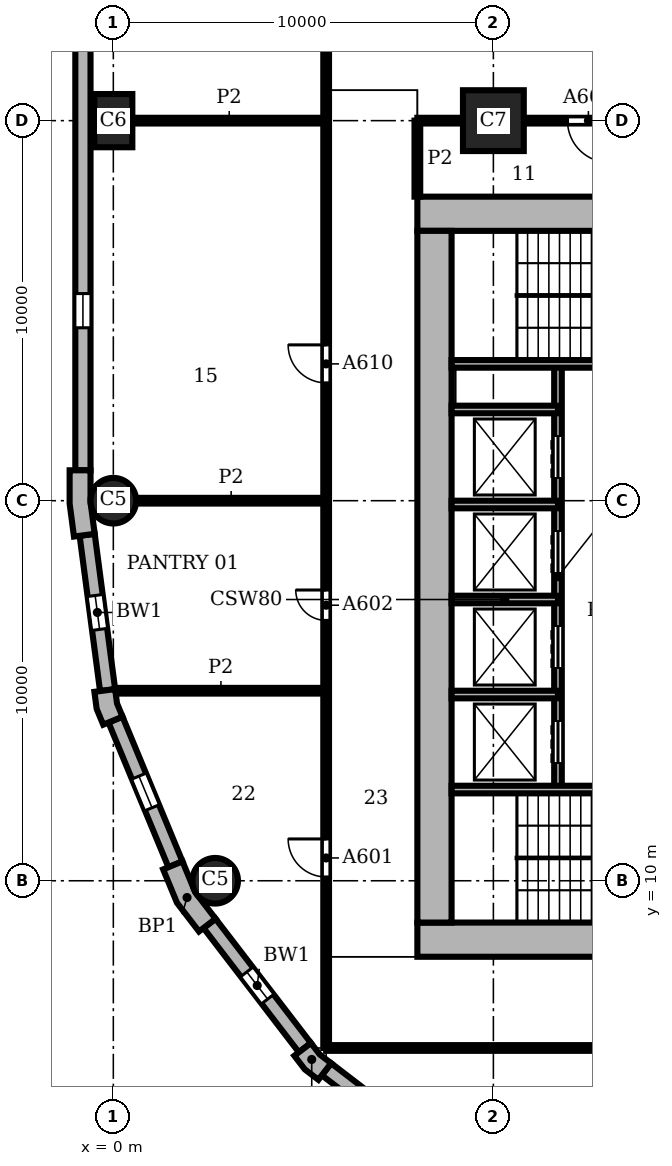
"""IFC4 building model, lengths in metres.
Left out: names, types, materials, properties, quantities, classifications, styles, units other than length and angle.
Written with IfcOpenShell. Run it as: python <this file> out.ifc"""

import sys

from ifc_helpers import new_model, si_unit, direction, frame, frame_2d, origin, origin_2d, place, context, subcontext, project, spatial, polyline, rectangle, circle, outline, extrude, element, fill, save


model = new_model("IFC4")
c1 = context("Model", 3, precision=1e-05, world=origin(), true_north=direction((0.0, 1.0)))
c2 = subcontext(c1, "Body", "Model", "MODEL_VIEW")
j1 = project(units=[si_unit("LENGTHUNIT", "METRE"), si_unit("PLANEANGLEUNIT", "RADIAN")], contexts=[c1])
p1 = place(None, origin())
s1 = spatial("IfcSite", under=j1, at=p1, CompositionType="ELEMENT")
p2 = place(p1, origin())
s2 = spatial("IfcBuilding", under=s1, at=p2, CompositionType="ELEMENT")
p3 = place(p2, frame((0.0, 0.0, 70.5)))
s3 = spatial("IfcBuildingStorey", under=s2, at=p3, CompositionType="ELEMENT", Elevation=70.5)
p4 = place(p3, frame((0.0, 30.0, 0.0), z_axis=(0.0, 0.0, 1.0), x_axis=(0.0, 1.0, 0.0)))
e1 = element("IfcColumn", 1, at=p4, inside=s3, PredefinedType="COLUMN", context=c2, shape_type="SweptSolid", body=[
    extrude(rectangle(XDim=1.4, YDim=1.0, at=origin_2d()), origin(), (0.0, 0.0, 1.0), 3.9),
])
for number, where, z_axis, x_axis in (
    (2, (0.0, 20.0, 0.0), (0.0, 0.0, 1.0), (1.0, 0.0, 0.0)),
    (3, (2.679, 10.0, 0.0), (0.0, 0.0, 1.0), (1.0, 0.0, 0.0)),
):
    element("IfcColumn", number, at=place(p3, frame(where, z_axis=z_axis, x_axis=x_axis)), inside=s3, PredefinedType="COLUMN", context=c2, shape_type="SweptSolid", body=[
        extrude(circle(Radius=0.6, at=origin_2d()), origin(), (0.0, 0.0, 1.0), 3.9),
    ])
p5 = place(p3, frame((10.0, 30.0, 0.0), z_axis=(0.0, 0.0, 1.0), x_axis=(1.0, 0.0, 0.0)))
e4 = element("IfcColumn", 4, at=p5, inside=s3, PredefinedType="COLUMN", context=c2, shape_type="SweptSolid", body=[
    extrude(rectangle(XDim=1.6, YDim=1.6, at=origin_2d()), origin(), (0.0, 0.0, 1.0), 3.9),
])
for number, where, z_axis, x_axis in (
    (5, (8.0, 8.45, 0.0), (0.0, 0.0, 1.0), (1.0, 0.0, 0.0)),
    (6, (28.0, 27.55, 0.0), (0.0, 0.0, 1.0), (-1.0, 0.0, 0.0)),
):
    element("IfcWall", number, at=place(p3, frame(where, z_axis=z_axis, x_axis=x_axis)), inside=s3, PredefinedType="SHEAR", context=c2, shape_type="SweptSolid", body=[
        extrude(rectangle(XDim=20.0, YDim=0.9, at=frame_2d((10.0, 0.0))), origin(), (0.0, 0.0, 1.0), 3.9),
    ])
p6 = place(p3, frame((8.45, 27.1, 0.0), z_axis=(0.0, 0.0, 1.0), x_axis=(0.0, -1.0, 0.0)))
e7 = element("IfcWall", 7, at=p6, inside=s3, PredefinedType="SHEAR", context=c2, shape_type="SweptSolid", body=[
    extrude(rectangle(XDim=18.2, YDim=0.9, at=frame_2d((9.1, 0.0))), origin(), (0.0, 0.0, 1.0), 3.9),
])
p7 = place(p3, origin())
e8 = element("IfcWall", 8, at=p7, inside=s3, PredefinedType="SOLIDWALL", context=c2, shape_type="SweptSolid", body=[
    extrude(outline(polyline([(-1.0, 20.8), (-1.15, 20.8), (-1.15, 19.925), (-1.036, 19.057), (-0.887, 19.076), (-0.49, 19.128), (-0.6, 19.961), (-0.6, 20.8), (-1.0, 20.8)])), origin(), (0.0, 0.0, 1.0), 3.9),
])
e9 = element("IfcWall", 9, at=p7, inside=s3, PredefinedType="SOLIDWALL", context=c2, shape_type="SweptSolid", body=[
    extrude(outline(polyline([(-0.349, 14.99), (-0.498, 14.971), (-0.439, 14.523), (-0.266, 14.106), (-0.128, 14.164), (0.242, 14.317), (0.097, 14.667), (0.047, 15.043), (-0.349, 14.99)])), origin(), (0.0, 0.0, 1.0), 3.9),
])
e10 = element("IfcWall", 10, at=p7, inside=s3, PredefinedType="SOLIDWALL", context=c2, shape_type="SweptSolid", body=[
    extrude(outline(polyline([(1.449, 10.356), (1.311, 10.299), (1.675, 9.42), (2.254, 8.665), (2.373, 8.757), (2.69, 9.0), (2.155, 9.698), (1.819, 10.51), (1.449, 10.356)])), origin(), (0.0, 0.0, 1.0), 3.9),
])
e11 = element("IfcWall", 11, at=p7, inside=s3, PredefinedType="SOLIDWALL", context=c2, shape_type="SweptSolid", body=[
    extrude(outline(polyline([(4.882, 5.487), (4.763, 5.396), (5.038, 5.038), (5.396, 4.763), (5.487, 4.882), (5.731, 5.199), (5.43, 5.43), (5.199, 5.731), (4.882, 5.487)])), origin(), (0.0, 0.0, 1.0), 3.9),
])
p8 = place(p3, frame((-0.8, 39.2, 0.0), z_axis=(0.0, 0.0, 1.0), x_axis=(0.0, -1.0, 0.0)))
e12 = element("IfcWall", 12, at=p8, inside=s3, PredefinedType="SOLIDWALL", context=c2, shape_type="SweptSolid", body=[
    extrude(rectangle(XDim=18.4, YDim=0.4, at=frame_2d((9.2, 0.0))), origin(), (0.0, 0.0, 1.0), 3.9),
])
p9 = place(p8, frame((3.75, 0.0, 0.9)))
e13 = element("IfcOpeningElement", 13, at=p9, cuts=e12, PredefinedType="OPENING", context=c2, shape_type="SweptSolid", body=[
    extrude(rectangle(XDim=0.9, YDim=2.35, at=frame_2d((0.45, 1.175))), frame((0.0, 0.21, 0.0), z_axis=(0.0, -1.0, 0.0), x_axis=(1.0, 0.0, 0.0)), (0.0, 0.0, 1.0), 0.42),
])
p10 = place(p8, frame((13.75, 0.0, 0.9)))
e14 = element("IfcOpeningElement", 14, at=p10, cuts=e12, PredefinedType="OPENING", context=c2, shape_type="SweptSolid", body=[
    extrude(rectangle(XDim=0.9, YDim=2.35, at=frame_2d((0.45, 1.175))), frame((0.0, 0.21, 0.0), z_axis=(0.0, -1.0, 0.0), x_axis=(1.0, 0.0, 0.0)), (0.0, 0.0, 1.0), 0.42),
])
p11 = place(p3, frame((-0.689, 19.102, 0.0), z_axis=(0.0, 0.0, 1.0), x_axis=(0.130514280502, -0.991446429508, 0.0)))
e15 = element("IfcWall", 15, at=p11, inside=s3, PredefinedType="SOLIDWALL", context=c2, shape_type="SweptSolid", body=[
    extrude(rectangle(XDim=4.121, YDim=0.4, at=frame_2d((2.061, 0.0))), origin(), (0.0, 0.0, 1.0), 3.9),
])
p12 = place(p11, frame((1.611, 0.0, 0.9)))
e16 = element("IfcOpeningElement", 16, at=p12, cuts=e15, PredefinedType="OPENING", context=c2, shape_type="SweptSolid", body=[
    extrude(rectangle(XDim=0.9, YDim=2.35, at=frame_2d((0.45, 1.175))), frame((0.0, 0.21, 0.0), z_axis=(0.0, -1.0, 0.0), x_axis=(1.0, 0.0, 0.0)), (0.0, 0.0, 1.0), 0.42),
])
p13 = place(p3, frame((0.057, 14.24, 0.0), z_axis=(0.0, 0.0, 1.0), x_axis=(0.382721546029, -0.923863744394, 0.0)))
e17 = element("IfcWall", 17, at=p13, inside=s3, PredefinedType="SOLIDWALL", context=c2, shape_type="SweptSolid", body=[
    extrude(rectangle(XDim=4.121, YDim=0.4, at=frame_2d((2.061, 0.0))), origin(), (0.0, 0.0, 1.0), 3.9),
])
p14 = place(p13, frame((1.611, 0.0, 0.9)))
e18 = element("IfcOpeningElement", 18, at=p14, cuts=e17, PredefinedType="OPENING", context=c2, shape_type="SweptSolid", body=[
    extrude(rectangle(XDim=0.9, YDim=2.35, at=frame_2d((0.45, 1.175))), frame((0.0, 0.21, 0.0), z_axis=(0.0, -1.0, 0.0), x_axis=(1.0, 0.0, 0.0)), (0.0, 0.0, 1.0), 0.42),
])
p15 = place(p3, frame((2.532, 8.878, 0.0), z_axis=(0.0, 0.0, 1.0), x_axis=(0.608759824817, -0.793354571229, 0.0)))
e19 = element("IfcWall", 19, at=p15, inside=s3, PredefinedType="SOLIDWALL", context=c2, shape_type="SweptSolid", body=[
    extrude(rectangle(XDim=4.121, YDim=0.4, at=frame_2d((2.061, 0.0))), origin(), (0.0, 0.0, 1.0), 3.9),
])
p16 = place(p15, frame((1.611, 0.0, 0.9)))
e20 = element("IfcOpeningElement", 20, at=p16, cuts=e19, PredefinedType="OPENING", context=c2, shape_type="SweptSolid", body=[
    extrude(rectangle(XDim=0.9, YDim=2.35, at=frame_2d((0.45, 1.175))), frame((0.0, 0.21, 0.0), z_axis=(0.0, -1.0, 0.0), x_axis=(1.0, 0.0, 0.0)), (0.0, 0.0, 1.0), 0.42),
])
p17 = place(p3, frame((5.609, 5.041, 0.0), z_axis=(0.0, 0.0, 1.0), x_axis=(0.793354571229, -0.608759824817, 0.0)))
e21 = element("IfcWall", 21, at=p17, inside=s3, PredefinedType="SOLIDWALL", context=c2, shape_type="SweptSolid", body=[
    extrude(rectangle(XDim=4.121, YDim=0.4, at=frame_2d((2.061, 0.0))), origin(), (0.0, 0.0, 1.0), 3.9),
])
p18 = place(p17, frame((1.611, 0.0, 0.9)))
e22 = element("IfcOpeningElement", 22, at=p18, cuts=e21, PredefinedType="OPENING", context=c2, shape_type="SweptSolid", body=[
    extrude(rectangle(XDim=0.9, YDim=2.35, at=frame_2d((0.45, 1.175))), frame((0.0, 0.21, 0.0), z_axis=(0.0, -1.0, 0.0), x_axis=(1.0, 0.0, 0.0)), (0.0, 0.0, 1.0), 0.42),
])
p19 = place(p3, frame((8.9, 12.4, 0.0), z_axis=(0.0, 0.0, 1.0), x_axis=(1.0, 0.0, 0.0)))
e23 = element("IfcWall", 23, at=p19, inside=s3, PredefinedType="SHEAR", context=c2, shape_type="SweptSolid", body=[
    extrude(rectangle(XDim=4.9, YDim=0.2, at=frame_2d((2.45, 0.0))), origin(), (0.0, 0.0, 1.0), 3.58),
])
for number, where, z_axis, x_axis in (
    (24, (8.9, 14.9, 0.0), (0.0, 0.0, 1.0), (1.0, 0.0, 0.0)),
    (25, (8.9, 17.4, 0.0), (0.0, 0.0, 1.0), (1.0, 0.0, 0.0)),
    (26, (8.9, 19.9, 0.0), (0.0, 0.0, 1.0), (1.0, 0.0, 0.0)),
    (27, (8.9, 22.4, 0.0), (0.0, 0.0, 1.0), (1.0, 0.0, 0.0)),
):
    element("IfcWall", number, at=place(p3, frame(where, z_axis=z_axis, x_axis=x_axis)), inside=s3, PredefinedType="SHEAR", context=c2, shape_type="SweptSolid", body=[
        extrude(rectangle(XDim=2.8, YDim=0.2, at=frame_2d((1.4, 0.0))), origin(), (0.0, 0.0, 1.0), 3.58),
    ])
p20 = place(p3, frame((8.9, 23.6, 0.0), z_axis=(0.0, 0.0, 1.0), x_axis=(1.0, 0.0, 0.0)))
e28 = element("IfcWall", 28, at=p20, inside=s3, PredefinedType="SHEAR", context=c2, shape_type="SweptSolid", body=[
    extrude(rectangle(XDim=4.9, YDim=0.2, at=frame_2d((2.45, 0.0))), origin(), (0.0, 0.0, 1.0), 3.58),
])
p21 = place(p3, frame((11.7, 12.4, 0.0), z_axis=(0.0, 0.0, 1.0), x_axis=(0.0, 1.0, 0.0)))
e29 = element("IfcWall", 29, at=p21, inside=s3, PredefinedType="SHEAR", context=c2, shape_type="SweptSolid", body=[
    extrude(rectangle(XDim=11.2, YDim=0.2, at=frame_2d((5.6, 0.0))), origin(), (0.0, 0.0, 1.0), 3.58),
])
p22 = place(p21, frame((0.7, 0.0, 0.0)))
e30 = element("IfcOpeningElement", 30, at=p22, cuts=e29, PredefinedType="OPENING", context=c2, shape_type="SweptSolid", body=[
    extrude(rectangle(XDim=1.1, YDim=2.1, at=frame_2d((0.55, 1.05))), frame((0.0, 0.11, 0.0), z_axis=(0.0, -1.0, 0.0), x_axis=(1.0, 0.0, 0.0)), (0.0, 0.0, 1.0), 0.22),
])
p23 = place(p21, frame((3.2, 0.0, 0.0)))
e31 = element("IfcOpeningElement", 31, at=p23, cuts=e29, PredefinedType="OPENING", context=c2, shape_type="SweptSolid", body=[
    extrude(rectangle(XDim=1.1, YDim=2.1, at=frame_2d((0.55, 1.05))), frame((0.0, 0.11, 0.0), z_axis=(0.0, -1.0, 0.0), x_axis=(1.0, 0.0, 0.0)), (0.0, 0.0, 1.0), 0.22),
])
p24 = place(p21, frame((5.7, 0.0, 0.0)))
e32 = element("IfcOpeningElement", 32, at=p24, cuts=e29, PredefinedType="OPENING", context=c2, shape_type="SweptSolid", body=[
    extrude(rectangle(XDim=1.1, YDim=2.1, at=frame_2d((0.55, 1.05))), frame((0.0, 0.11, 0.0), z_axis=(0.0, -1.0, 0.0), x_axis=(1.0, 0.0, 0.0)), (0.0, 0.0, 1.0), 0.22),
])
p25 = place(p21, frame((8.2, 0.0, 0.0)))
e33 = element("IfcOpeningElement", 33, at=p25, cuts=e29, PredefinedType="OPENING", context=c2, shape_type="SweptSolid", body=[
    extrude(rectangle(XDim=1.1, YDim=2.1, at=frame_2d((0.55, 1.05))), frame((0.0, 0.11, 0.0), z_axis=(0.0, -1.0, 0.0), x_axis=(1.0, 0.0, 0.0)), (0.0, 0.0, 1.0), 0.22),
])
p26 = place(p3, frame((5.6, 5.6, 0.0), z_axis=(0.0, 0.0, 1.0), x_axis=(0.0, 1.0, 0.0)))
e34 = element("IfcWall", 34, at=p26, inside=s3, PredefinedType="PARTITIONING", context=c2, shape_type="SweptSolid", body=[
    extrude(rectangle(XDim=54.4, YDim=0.15, at=frame_2d((27.2, 0.0))), origin(), (0.0, 0.0, 1.0), 3.58),
])
p27 = place(p26, frame((4.5, 0.0, 0.0)))
e35 = element("IfcOpeningElement", 35, at=p27, cuts=e34, PredefinedType="OPENING", context=c2, shape_type="SweptSolid", body=[
    extrude(rectangle(XDim=1.0, YDim=2.1, at=frame_2d((0.5, 1.05))), frame((0.0, 0.085, 0.0), z_axis=(0.0, -1.0, 0.0), x_axis=(1.0, 0.0, 0.0)), (0.0, 0.0, 1.0), 0.17),
])
p28 = place(p26, frame((11.25, 0.0, 0.0)))
e36 = element("IfcOpeningElement", 36, at=p28, cuts=e34, PredefinedType="OPENING", context=c2, shape_type="SweptSolid", body=[
    extrude(rectangle(XDim=0.8, YDim=2.1, at=frame_2d((0.4, 1.05))), frame((0.0, 0.085, 0.0), z_axis=(0.0, -1.0, 0.0), x_axis=(1.0, 0.0, 0.0)), (0.0, 0.0, 1.0), 0.17),
])
p29 = place(p26, frame((17.5, 0.0, 0.0)))
e37 = element("IfcOpeningElement", 37, at=p29, cuts=e34, PredefinedType="OPENING", context=c2, shape_type="SweptSolid", body=[
    extrude(rectangle(XDim=1.0, YDim=2.1, at=frame_2d((0.5, 1.05))), frame((0.0, 0.085, 0.0), z_axis=(0.0, -1.0, 0.0), x_axis=(1.0, 0.0, 0.0)), (0.0, 0.0, 1.0), 0.17),
])
p30 = place(p26, frame((30.05, 0.0, 0.0)))
e38 = element("IfcOpeningElement", 38, at=p30, cuts=e34, PredefinedType="OPENING", context=c2, shape_type="SweptSolid", body=[
    extrude(rectangle(XDim=1.0, YDim=2.1, at=frame_2d((0.5, 1.05))), frame((0.0, 0.085, 0.0), z_axis=(0.0, -1.0, 0.0), x_axis=(1.0, 0.0, 0.0)), (0.0, 0.0, 1.0), 0.17),
])
p31 = place(p26, frame((37.75, 0.0, 0.0)))
e39 = element("IfcOpeningElement", 39, at=p31, cuts=e34, PredefinedType="OPENING", context=c2, shape_type="SweptSolid", body=[
    extrude(rectangle(XDim=1.0, YDim=2.1, at=frame_2d((0.5, 1.05))), frame((0.0, 0.085, 0.0), z_axis=(0.0, -1.0, 0.0), x_axis=(1.0, 0.0, 0.0)), (0.0, 0.0, 1.0), 0.17),
])
p32 = place(p26, frame((48.25, 0.0, 0.0)))
e40 = element("IfcOpeningElement", 40, at=p32, cuts=e34, PredefinedType="OPENING", context=c2, shape_type="SweptSolid", body=[
    extrude(rectangle(XDim=1.0, YDim=2.1, at=frame_2d((0.5, 1.05))), frame((0.0, 0.085, 0.0), z_axis=(0.0, -1.0, 0.0), x_axis=(1.0, 0.0, 0.0)), (0.0, 0.0, 1.0), 0.17),
])
p33 = place(p3, frame((8.0, 28.0, 0.0), z_axis=(0.0, 0.0, 1.0), x_axis=(0.0, 1.0, 0.0)))
e41 = element("IfcWall", 41, at=p33, inside=s3, PredefinedType="PARTITIONING", context=c2, shape_type="SweptSolid", body=[
    extrude(rectangle(XDim=2.0, YDim=0.15, at=frame_2d((1.0, 0.0))), origin(), (0.0, 0.0, 1.0), 3.58),
])
p34 = place(p3, frame((5.6, 5.6, 0.0), z_axis=(0.0, 0.0, 1.0), x_axis=(1.0, 0.0, 0.0)))
e42 = element("IfcWall", 42, at=p34, inside=s3, PredefinedType="PARTITIONING", context=c2, shape_type="SweptSolid", body=[
    extrude(rectangle(XDim=25.4, YDim=0.15, at=frame_2d((12.7, 0.0))), origin(), (0.0, 0.0, 1.0), 3.58),
])
p35 = place(p3, frame((0.063, 15.0, 0.0), z_axis=(0.0, 0.0, 1.0), x_axis=(1.0, 0.0, 0.0)))
e43 = element("IfcWall", 43, at=p35, inside=s3, PredefinedType="PARTITIONING", context=c2, shape_type="SweptSolid", body=[
    extrude(rectangle(XDim=5.537, YDim=0.15, at=frame_2d((2.769, 0.0))), origin(), (0.0, 0.0, 1.0), 3.58),
])
p36 = place(p3, frame((0.6, 20.0, 0.0), z_axis=(0.0, 0.0, 1.0), x_axis=(1.0, 0.0, 0.0)))
e44 = element("IfcWall", 44, at=p36, inside=s3, PredefinedType="PARTITIONING", context=c2, shape_type="SweptSolid", body=[
    extrude(rectangle(XDim=5.0, YDim=0.15, at=frame_2d((2.5, 0.0))), origin(), (0.0, 0.0, 1.0), 3.58),
])
p37 = place(p3, frame((0.5, 30.0, 0.0), z_axis=(0.0, 0.0, 1.0), x_axis=(1.0, 0.0, 0.0)))
e45 = element("IfcWall", 45, at=p37, inside=s3, PredefinedType="PARTITIONING", context=c2, shape_type="SweptSolid", body=[
    extrude(rectangle(XDim=5.1, YDim=0.15, at=frame_2d((2.55, 0.0))), origin(), (0.0, 0.0, 1.0), 3.58),
])
p38 = place(p3, frame((8.0, 30.0, 0.0), z_axis=(0.0, 0.0, 1.0), x_axis=(1.0, 0.0, 0.0)))
e46 = element("IfcWall", 46, at=p38, inside=s3, PredefinedType="PARTITIONING", context=c2, shape_type="SweptSolid", body=[
    extrude(rectangle(XDim=1.2, YDim=0.15, at=frame_2d((0.6, 0.0))), origin(), (0.0, 0.0, 1.0), 3.58),
])
p39 = place(p3, frame((10.8, 30.0, 0.0), z_axis=(0.0, 0.0, 1.0), x_axis=(1.0, 0.0, 0.0)))
e47 = element("IfcWall", 47, at=p39, inside=s3, PredefinedType="PARTITIONING", context=c2, shape_type="SweptSolid", body=[
    extrude(rectangle(XDim=3.0, YDim=0.15, at=frame_2d((1.5, 0.0))), origin(), (0.0, 0.0, 1.0), 3.58),
])
p40 = place(p39, frame((1.15, 0.0, 0.0)))
e48 = element("IfcOpeningElement", 48, at=p40, cuts=e47, PredefinedType="OPENING", context=c2, shape_type="SweptSolid", body=[
    extrude(rectangle(XDim=1.1, YDim=2.1, at=frame_2d((0.55, 1.05))), frame((0.0, 0.085, 0.0), z_axis=(0.0, -1.0, 0.0), x_axis=(1.0, 0.0, 0.0)), (0.0, 0.0, 1.0), 0.17),
])
p41 = place(p10, origin())
e49 = element("IfcWindow", 49, at=p41, inside=s3, PartitioningType="SINGLE_PANEL", PredefinedType="WINDOW", context=c2, shape_type="SweptSolid", body=[
    extrude(rectangle(XDim=0.9, YDim=2.35, at=frame_2d((0.45, 1.175))), frame((0.0, 0.16, 0.0), z_axis=(0.0, -1.0, 0.0), x_axis=(1.0, 0.0, 0.0)), (0.0, 0.0, 1.0), 0.06),
])
fill(e14, e49)
p42 = place(p12, origin())
e50 = element("IfcWindow", 50, at=p42, inside=s3, PartitioningType="SINGLE_PANEL", PredefinedType="WINDOW", context=c2, shape_type="SweptSolid", body=[
    extrude(rectangle(XDim=0.9, YDim=2.35, at=frame_2d((0.45, 1.175))), frame((0.0, 0.16, 0.0), z_axis=(0.0, -1.0, 0.0), x_axis=(1.0, 0.0, 0.0)), (0.0, 0.0, 1.0), 0.06),
])
fill(e16, e50)
p43 = place(p14, origin())
e51 = element("IfcWindow", 51, at=p43, inside=s3, PartitioningType="SINGLE_PANEL", PredefinedType="WINDOW", context=c2, shape_type="SweptSolid", body=[
    extrude(rectangle(XDim=0.9, YDim=2.35, at=frame_2d((0.45, 1.175))), frame((0.0, 0.16, 0.0), z_axis=(0.0, -1.0, 0.0), x_axis=(1.0, 0.0, 0.0)), (0.0, 0.0, 1.0), 0.06),
])
fill(e18, e51)
p44 = place(p16, origin())
e52 = element("IfcWindow", 52, at=p44, inside=s3, PartitioningType="SINGLE_PANEL", PredefinedType="WINDOW", context=c2, shape_type="SweptSolid", body=[
    extrude(rectangle(XDim=0.9, YDim=2.35, at=frame_2d((0.45, 1.175))), frame((0.0, 0.16, 0.0), z_axis=(0.0, -1.0, 0.0), x_axis=(1.0, 0.0, 0.0)), (0.0, 0.0, 1.0), 0.06),
])
fill(e20, e52)
p45 = place(p22, origin())
e53 = element("IfcDoor", 53, at=p45, inside=s3, OperationType="DOUBLE_DOOR_SLIDING", PredefinedType="DOOR", context=c2, shape_type="SweptSolid", body=[
    extrude(rectangle(XDim=1.1, YDim=2.1, at=frame_2d((0.55, 1.05))), frame((0.0, 0.025, 0.0), z_axis=(0.0, -1.0, 0.0), x_axis=(1.0, 0.0, 0.0)), (0.0, 0.0, 1.0), 0.05),
])
fill(e30, e53)
p46 = place(p23, origin())
e54 = element("IfcDoor", 54, at=p46, inside=s3, OperationType="DOUBLE_DOOR_SLIDING", PredefinedType="DOOR", context=c2, shape_type="SweptSolid", body=[
    extrude(rectangle(XDim=1.1, YDim=2.1, at=frame_2d((0.55, 1.05))), frame((0.0, 0.025, 0.0), z_axis=(0.0, -1.0, 0.0), x_axis=(1.0, 0.0, 0.0)), (0.0, 0.0, 1.0), 0.05),
])
fill(e31, e54)
p47 = place(p24, origin())
e55 = element("IfcDoor", 55, at=p47, inside=s3, OperationType="DOUBLE_DOOR_SLIDING", PredefinedType="DOOR", context=c2, shape_type="SweptSolid", body=[
    extrude(rectangle(XDim=1.1, YDim=2.1, at=frame_2d((0.55, 1.05))), frame((0.0, 0.025, 0.0), z_axis=(0.0, -1.0, 0.0), x_axis=(1.0, 0.0, 0.0)), (0.0, 0.0, 1.0), 0.05),
])
fill(e32, e55)
p48 = place(p25, origin())
e56 = element("IfcDoor", 56, at=p48, inside=s3, OperationType="DOUBLE_DOOR_SLIDING", PredefinedType="DOOR", context=c2, shape_type="SweptSolid", body=[
    extrude(rectangle(XDim=1.1, YDim=2.1, at=frame_2d((0.55, 1.05))), frame((0.0, 0.025, 0.0), z_axis=(0.0, -1.0, 0.0), x_axis=(1.0, 0.0, 0.0)), (0.0, 0.0, 1.0), 0.05),
])
fill(e33, e56)
p49 = place(p27, origin())
e57 = element("IfcDoor", 57, at=p49, inside=s3, OperationType="SINGLE_SWING_RIGHT", PredefinedType="DOOR", context=c2, shape_type="SweptSolid", body=[
    extrude(rectangle(XDim=1.0, YDim=2.1, at=frame_2d((0.5, 1.05))), frame((0.0, 0.025, 0.0), z_axis=(0.0, -1.0, 0.0), x_axis=(1.0, 0.0, 0.0)), (0.0, 0.0, 1.0), 0.05),
])
fill(e35, e57)
p50 = place(p28, origin())
e58 = element("IfcDoor", 58, at=p50, inside=s3, OperationType="SINGLE_SWING_RIGHT", PredefinedType="DOOR", context=c2, shape_type="SweptSolid", body=[
    extrude(rectangle(XDim=0.8, YDim=2.1, at=frame_2d((0.4, 1.05))), frame((0.0, 0.025, 0.0), z_axis=(0.0, -1.0, 0.0), x_axis=(1.0, 0.0, 0.0)), (0.0, 0.0, 1.0), 0.05),
])
fill(e36, e58)
p51 = place(p40, frame((1.1, 0.0, 0.0), z_axis=(0.0, 0.0, 1.0), x_axis=(-1.0, 0.0, 0.0)))
e59 = element("IfcDoor", 59, at=p51, inside=s3, OperationType="SINGLE_SWING_LEFT", PredefinedType="DOOR", context=c2, shape_type="SweptSolid", body=[
    extrude(rectangle(XDim=1.1, YDim=2.1, at=frame_2d((0.55, 1.05))), frame((0.0, 0.025, 0.0), z_axis=(0.0, -1.0, 0.0), x_axis=(1.0, 0.0, 0.0)), (0.0, 0.0, 1.0), 0.05),
])
fill(e48, e59)
p52 = place(p29, origin())
e60 = element("IfcDoor", 60, at=p52, inside=s3, OperationType="SINGLE_SWING_RIGHT", PredefinedType="DOOR", context=c2, shape_type="SweptSolid", body=[
    extrude(rectangle(XDim=1.0, YDim=2.1, at=frame_2d((0.5, 1.05))), frame((0.0, 0.025, 0.0), z_axis=(0.0, -1.0, 0.0), x_axis=(1.0, 0.0, 0.0)), (0.0, 0.0, 1.0), 0.05),
])
fill(e37, e60)
save(model, sys.argv[1])
